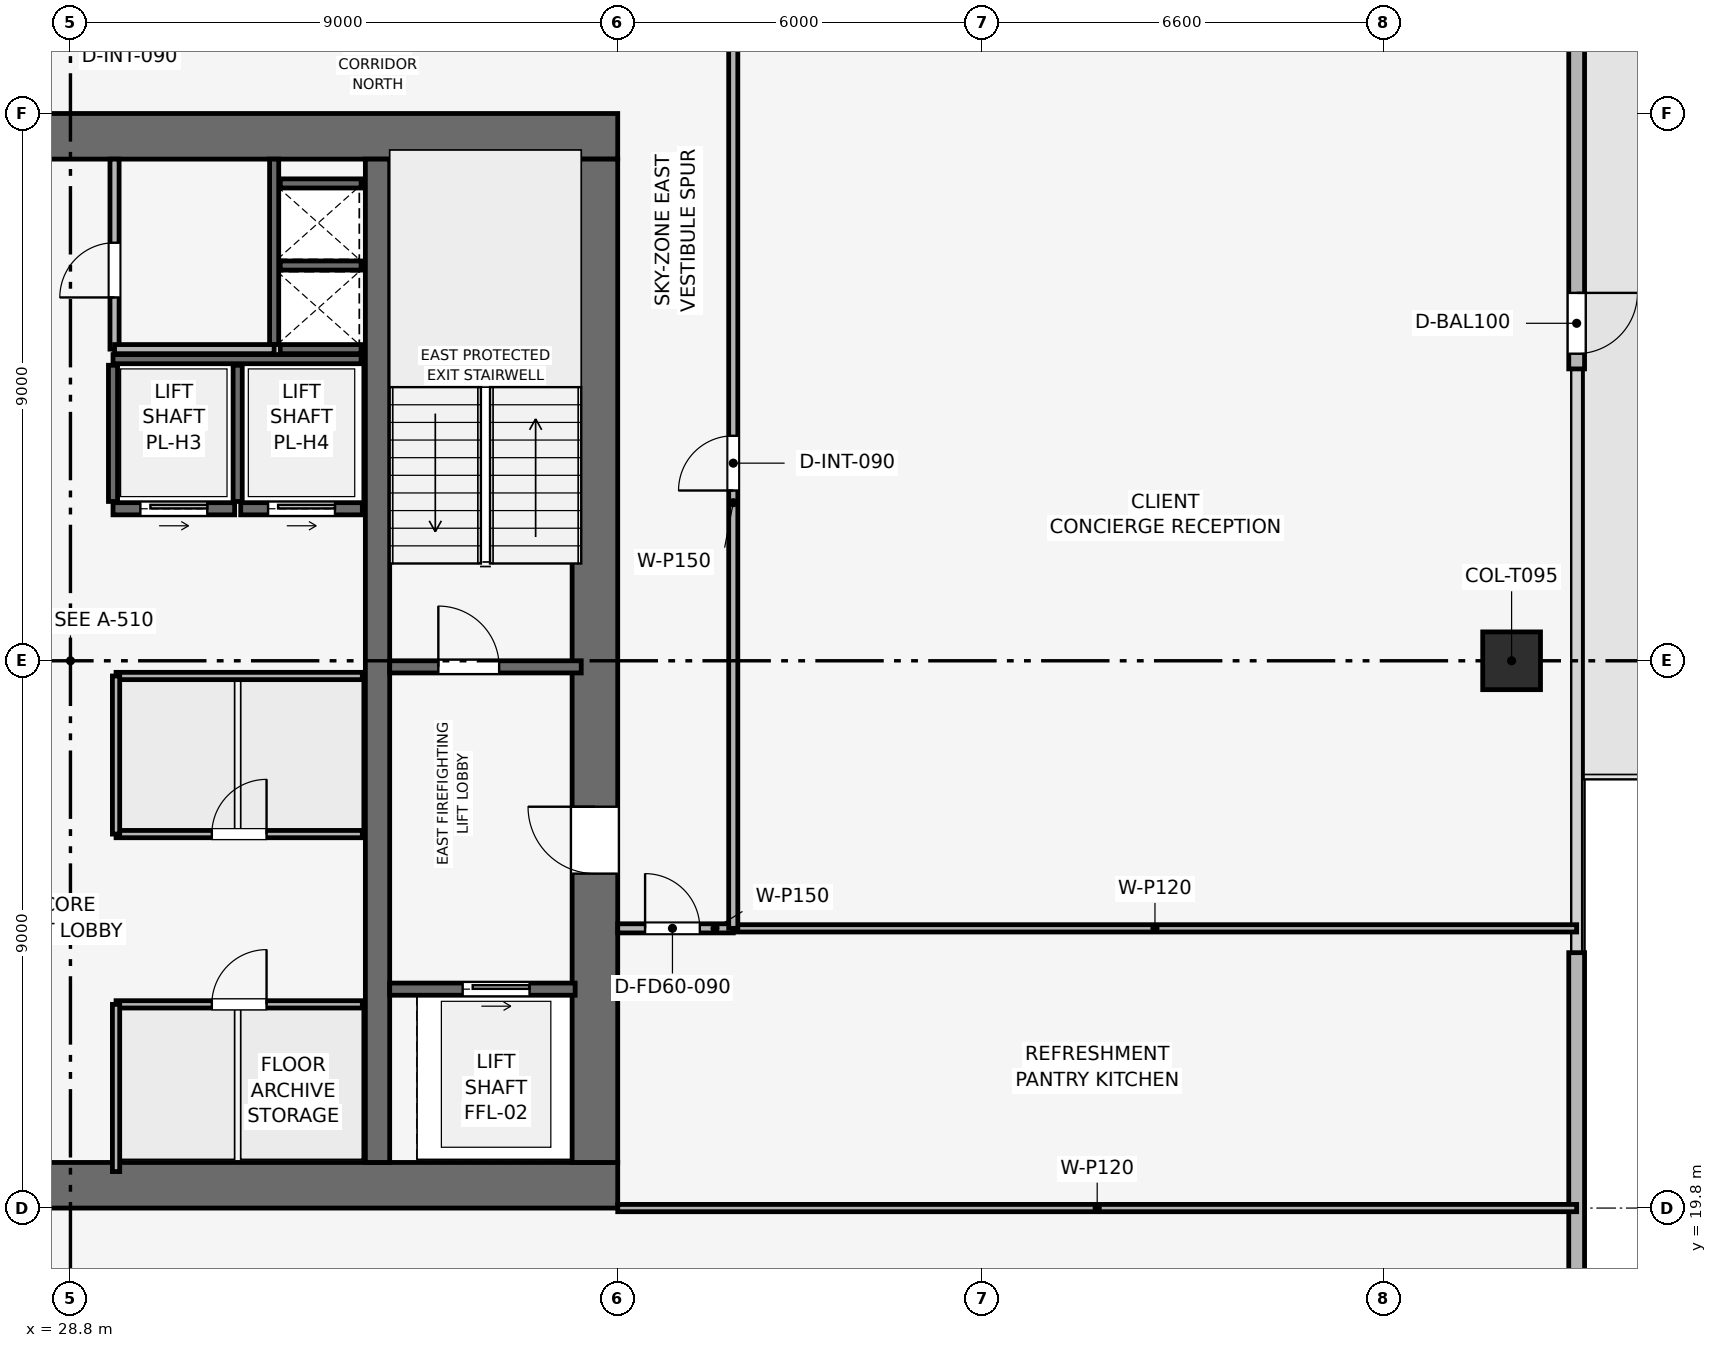
"""IFC4 building model, lengths in metres.
Left out: names, types, materials, properties, quantities, classifications, styles, units other than length and angle.
Written with IfcOpenShell. Run it as: python <this file> out.ifc"""

import sys

from ifc_helpers import new_model, si_unit, direction, frame, frame_2d, origin, origin_2d, place, context, subcontext, project, spatial, rectangle, extrude, element, fill, save


model = new_model("IFC4")
c1 = context("Model", 3, precision=1e-05, world=origin(), true_north=direction((0.0, 1.0)))
c2 = subcontext(c1, "Body", "Model", "MODEL_VIEW")
j1 = project(units=[si_unit("LENGTHUNIT", "METRE"), si_unit("PLANEANGLEUNIT", "RADIAN")], contexts=[c1])
p1 = place(None, origin())
s1 = spatial("IfcSite", under=j1, at=p1, CompositionType="ELEMENT")
p2 = place(p1, origin())
s2 = spatial("IfcBuilding", under=s1, at=p2, CompositionType="ELEMENT")
p3 = place(p2, frame((0.0, 0.0, 261.6)))
s3 = spatial("IfcBuildingStorey", under=s2, at=p3, CompositionType="ELEMENT", Elevation=261.6)
p4 = place(p3, frame((19.8, 20.175, 0.0), z_axis=(0.0, 0.0, 1.0), x_axis=(1.0, 0.0, 0.0)))
e1 = element("IfcWall", 1, at=p4, inside=s3, PredefinedType="SHEAR", context=c2, shape_type="SweptSolid", body=[
    extrude(rectangle(XDim=18.0, YDim=0.75, at=frame_2d((9.0, 0.0))), origin(), (0.0, 0.0, 1.0), 3.75),
])
p5 = place(p3, frame((19.8, 37.425, 0.0), z_axis=(0.0, 0.0, 1.0), x_axis=(1.0, 0.0, 0.0)))
e2 = element("IfcWall", 2, at=p5, inside=s3, PredefinedType="SHEAR", context=c2, shape_type="SweptSolid", body=[
    extrude(rectangle(XDim=18.0, YDim=0.75, at=frame_2d((9.0, 0.0))), origin(), (0.0, 0.0, 1.0), 3.75),
])
p6 = place(p5, frame((7.05, 0.0, 0.0)))
e3 = element("IfcOpeningElement", 3, at=p6, cuts=e2, PredefinedType="OPENING", context=c2, shape_type="SweptSolid", body=[
    extrude(rectangle(XDim=1.1, YDim=2.15, at=frame_2d((0.55, 1.075))), frame((0.0, 0.385, 0.0), z_axis=(0.0, -1.0, 0.0), x_axis=(1.0, 0.0, 0.0)), (0.0, 0.0, 1.0), 0.77),
])
p7 = place(p3, frame((37.425, 20.55, 0.0), z_axis=(0.0, 0.0, 1.0), x_axis=(0.0, 1.0, 0.0)))
e4 = element("IfcWall", 4, at=p7, inside=s3, PredefinedType="SHEAR", context=c2, shape_type="SweptSolid", body=[
    extrude(rectangle(XDim=16.5, YDim=0.75, at=frame_2d((8.25, 0.0))), origin(), (0.0, 0.0, 1.0), 3.75),
])
p8 = place(p7, frame((4.75, 0.0, 0.0)))
e5 = element("IfcOpeningElement", 5, at=p8, cuts=e4, PredefinedType="OPENING", context=c2, shape_type="SweptSolid", body=[
    extrude(rectangle(XDim=1.1, YDim=2.15, at=frame_2d((0.55, 1.075))), frame((0.0, 0.385, 0.0), z_axis=(0.0, -1.0, 0.0), x_axis=(1.0, 0.0, 0.0)), (0.0, 0.0, 1.0), 0.77),
])
p9 = place(p3, frame((33.85, 20.55, 0.0), z_axis=(0.0, 0.0, 1.0), x_axis=(0.0, 1.0, 0.0)))
e6 = element("IfcWall", 6, at=p9, inside=s3, PredefinedType="SHEAR", context=c2, shape_type="SweptSolid", body=[
    extrude(rectangle(XDim=16.5, YDim=0.4, at=frame_2d((8.25, 0.0))), origin(), (0.0, 0.0, 1.0), 3.75),
])
p10 = place(p3, frame((52.5, 28.8, 0.003), z_axis=(0.0, 0.0, 1.0), x_axis=(1.0, 0.0, 0.0)))
e7 = element("IfcColumn", 7, at=p10, inside=s3, PredefinedType="COLUMN", context=c2, shape_type="SweptSolid", body=[
    extrude(rectangle(XDim=0.95, YDim=0.95, at=origin_2d()), origin(), (0.0, 0.0, 1.0), 3.494),
])
p11 = place(p3, frame((53.57, 46.8, 0.0), z_axis=(0.0, 0.0, 1.0), x_axis=(0.0, -1.0, 0.0)))
e8 = element("IfcWall", 8, at=p11, inside=s3, PredefinedType="SOLIDWALL", context=c2, shape_type="SweptSolid", body=[
    extrude(rectangle(XDim=13.2, YDim=0.26, at=frame_2d((6.6, 0.0))), origin(), (0.0, 0.0, 1.0), 3.5),
])
p12 = place(p11, frame((11.95, 0.0, 0.0)))
e9 = element("IfcOpeningElement", 9, at=p12, cuts=e8, PredefinedType="OPENING", context=c2, shape_type="SweptSolid", body=[
    extrude(rectangle(XDim=1.0, YDim=2.2, at=frame_2d((0.5, 1.1))), frame((0.0, 0.14, 0.0), z_axis=(0.0, -1.0, 0.0), x_axis=(1.0, 0.0, 0.0)), (0.0, 0.0, 1.0), 0.28),
])
p13 = place(p3, frame((53.57, 24.0, 0.0), z_axis=(0.0, 0.0, 1.0), x_axis=(0.0, -1.0, 0.0)))
e10 = element("IfcWall", 10, at=p13, inside=s3, PredefinedType="SOLIDWALL", context=c2, shape_type="SweptSolid", body=[
    extrude(rectangle(XDim=13.2, YDim=0.26, at=frame_2d((6.6, 0.0))), origin(), (0.0, 0.0, 1.0), 3.5),
])
p14 = place(p13, frame((11.75, 0.0, 0.9)))
e11 = element("IfcOpeningElement", 11, at=p14, cuts=e10, PredefinedType="OPENING", context=c2, shape_type="SweptSolid", body=[
    extrude(rectangle(XDim=1.2, YDim=2.1, at=frame_2d((0.6, 1.05))), frame((0.0, 0.14, 0.0), z_axis=(0.0, -1.0, 0.0), x_axis=(1.0, 0.0, 0.0)), (0.0, 0.0, 1.0), 0.28),
])
p15 = place(p3, frame((34.05, 28.7, 0.0), z_axis=(0.0, 0.0, 1.0), x_axis=(1.0, 0.0, 0.0)))
e12 = element("IfcWall", 12, at=p15, inside=s3, PredefinedType="SHEAR", context=c2, shape_type="SweptSolid", body=[
    extrude(rectangle(XDim=3.15, YDim=0.2, at=frame_2d((1.575, 0.0))), origin(), (0.0, 0.0, 1.0), 3.5),
])
p16 = place(p15, frame((0.8, 0.0, 0.0)))
e13 = element("IfcOpeningElement", 13, at=p16, cuts=e12, PredefinedType="OPENING", context=c2, shape_type="SweptSolid", body=[
    extrude(rectangle(XDim=1.0, YDim=2.1, at=frame_2d((0.5, 1.05))), frame((0.0, 0.11, 0.0), z_axis=(0.0, -1.0, 0.0), x_axis=(1.0, 0.0, 0.0)), (0.0, 0.0, 1.0), 0.22),
])
p17 = place(p3, frame((32.15, 34.0, 0.0), z_axis=(0.0, 0.0, 1.0), x_axis=(0.0, 1.0, 0.0)))
e14 = element("IfcWall", 14, at=p17, inside=s3, PredefinedType="SHEAR", context=c2, shape_type="SweptSolid", body=[
    extrude(rectangle(XDim=3.05, YDim=0.15, at=frame_2d((1.525, 0.0))), origin(), (0.0, 0.0, 1.0), 3.5),
])
for number, where, z_axis, x_axis in (
    (15, (32.25, 33.925, 0.0), (0.0, 0.0, 1.0), (1.0, 0.0, 0.0)),
    (16, (32.25, 35.3, 0.0), (0.0, 0.0, 1.0), (1.0, 0.0, 0.0)),
):
    element("IfcWall", number, at=place(p3, frame(where, z_axis=z_axis, x_axis=x_axis)), inside=s3, PredefinedType="SHEAR", context=c2, shape_type="SweptSolid", body=[
        extrude(rectangle(XDim=1.33, YDim=0.15, at=frame_2d((0.665, 0.0))), origin(), (0.0, 0.0, 1.0), 3.5),
    ])
p18 = place(p3, frame((34.05, 23.4, 0.0), z_axis=(0.0, 0.0, 1.0), x_axis=(1.0, 0.0, 0.0)))
e17 = element("IfcWall", 17, at=p18, inside=s3, PredefinedType="SHEAR", context=c2, shape_type="SweptSolid", body=[
    extrude(rectangle(XDim=3.05, YDim=0.2, at=frame_2d((1.525, 0.0))), origin(), (0.0, 0.0, 1.0), 3.5),
])
p19 = place(p18, frame((1.2, 0.0, 0.0)))
e18 = element("IfcOpeningElement", 18, at=p19, cuts=e17, PredefinedType="OPENING", context=c2, shape_type="SweptSolid", body=[
    extrude(rectangle(XDim=1.1, YDim=2.15, at=frame_2d((0.55, 1.075))), frame((0.0, 0.11, 0.0), z_axis=(0.0, -1.0, 0.0), x_axis=(1.0, 0.0, 0.0)), (0.0, 0.0, 1.0), 0.22),
])
p20 = place(p3, frame((29.5, 31.3, 0.0), z_axis=(0.0, 0.0, 1.0), x_axis=(1.0, 0.0, 0.0)))
e19 = element("IfcWall", 19, at=p20, inside=s3, PredefinedType="SHEAR", context=c2, shape_type="SweptSolid", body=[
    extrude(rectangle(XDim=2.0, YDim=0.2, at=frame_2d((1.0, 0.0))), origin(), (0.0, 0.0, 1.0), 3.5),
])
p21 = place(p20, frame((0.45, 0.0, 0.0)))
e20 = element("IfcOpeningElement", 20, at=p21, cuts=e19, PredefinedType="OPENING", context=c2, shape_type="SweptSolid", body=[
    extrude(rectangle(XDim=1.1, YDim=2.15, at=frame_2d((0.55, 1.075))), frame((0.0, 0.11, 0.0), z_axis=(0.0, -1.0, 0.0), x_axis=(1.0, 0.0, 0.0)), (0.0, 0.0, 1.0), 0.22),
])
p22 = place(p3, frame((31.6, 31.3, 0.0), z_axis=(0.0, 0.0, 1.0), x_axis=(1.0, 0.0, 0.0)))
e21 = element("IfcWall", 21, at=p22, inside=s3, PredefinedType="SHEAR", context=c2, shape_type="SweptSolid", body=[
    extrude(rectangle(XDim=2.0, YDim=0.2, at=frame_2d((1.0, 0.0))), origin(), (0.0, 0.0, 1.0), 3.5),
])
p23 = place(p22, frame((0.45, 0.0, 0.0)))
e22 = element("IfcOpeningElement", 22, at=p23, cuts=e21, PredefinedType="OPENING", context=c2, shape_type="SweptSolid", body=[
    extrude(rectangle(XDim=1.1, YDim=2.15, at=frame_2d((0.55, 1.075))), frame((0.0, 0.11, 0.0), z_axis=(0.0, -1.0, 0.0), x_axis=(1.0, 0.0, 0.0)), (0.0, 0.0, 1.0), 0.22),
])
p24 = place(p3, frame((32.25, 36.65, 0.0), z_axis=(0.0, 0.0, 1.0), x_axis=(1.0, 0.0, 0.0)))
e23 = element("IfcWall", 23, at=p24, inside=s3, PredefinedType="SHEAR", context=c2, shape_type="SweptSolid", body=[
    extrude(rectangle(XDim=1.33, YDim=0.15, at=frame_2d((0.665, 0.0))), origin(), (0.0, 0.0, 1.0), 3.5),
])
p25 = place(p3, frame((29.5, 33.76, 0.0), z_axis=(0.0, 0.0, 1.0), x_axis=(1.0, 0.0, 0.0)))
e24 = element("IfcWall", 24, at=p25, inside=s3, PredefinedType="SHEAR", context=c2, shape_type="SweptSolid", body=[
    extrude(rectangle(XDim=4.08, YDim=0.15, at=frame_2d((2.04, 0.0))), origin(), (0.0, 0.0, 1.0), 3.5),
])
for number, where, z_axis, x_axis in (
    (25, (29.5, 31.42, 0.0), (0.0, 0.0, 1.0), (0.0, 1.0, 0.0)),
    (26, (31.55, 31.42, 0.0), (0.0, 0.0, 1.0), (0.0, 1.0, 0.0)),
):
    element("IfcWall", number, at=place(p3, frame(where, z_axis=z_axis, x_axis=x_axis)), inside=s3, PredefinedType="SHEAR", context=c2, shape_type="SweptSolid", body=[
        extrude(rectangle(XDim=2.24, YDim=0.15, at=frame_2d((1.12, 0.0))), origin(), (0.0, 0.0, 1.0), 3.5),
    ])
p26 = place(p3, frame((29.525, 33.925, 0.0), z_axis=(0.0, 0.0, 1.0), x_axis=(0.0, 1.0, 0.0)))
e27 = element("IfcWall", 27, at=p26, inside=s3, PredefinedType="PARTITIONING", context=c2, shape_type="SweptSolid", body=[
    extrude(rectangle(XDim=3.125, YDim=0.15, at=frame_2d((1.562, 0.0))), origin(), (0.0, 0.0, 1.0), 3.5),
])
p27 = place(p26, frame((0.85, 0.0, 0.0)))
e28 = element("IfcOpeningElement", 28, at=p27, cuts=e27, PredefinedType="OPENING", context=c2, shape_type="SweptSolid", body=[
    extrude(rectangle(XDim=0.9, YDim=2.1, at=frame_2d((0.45, 1.05))), frame((0.0, 0.085, 0.0), z_axis=(0.0, -1.0, 0.0), x_axis=(1.0, 0.0, 0.0)), (0.0, 0.0, 1.0), 0.17),
])
p28 = place(p3, frame((29.525, 33.925, 0.0), z_axis=(0.0, 0.0, 1.0), x_axis=(1.0, 0.0, 0.0)))
e29 = element("IfcWall", 29, at=p28, inside=s3, PredefinedType="PARTITIONING", context=c2, shape_type="SweptSolid", body=[
    extrude(rectangle(XDim=2.625, YDim=0.15, at=frame_2d((1.312, 0.0))), origin(), (0.0, 0.0, 1.0), 3.5),
])
p29 = place(p3, frame((29.55, 23.15, 0.0), z_axis=(0.0, 0.0, 1.0), x_axis=(1.0, 0.0, 0.0)))
e30 = element("IfcWall", 30, at=p29, inside=s3, PredefinedType="PARTITIONING", context=c2, shape_type="SweptSolid", body=[
    extrude(rectangle(XDim=4.05, YDim=0.12, at=frame_2d((2.025, 0.0))), origin(), (0.0, 0.0, 1.0), 3.5),
])
p30 = place(p29, frame((1.575, 0.0, 0.0)))
e31 = element("IfcOpeningElement", 31, at=p30, cuts=e30, PredefinedType="OPENING", context=c2, shape_type="SweptSolid", body=[
    extrude(rectangle(XDim=0.9, YDim=2.1, at=frame_2d((0.45, 1.05))), frame((0.0, 0.07, 0.0), z_axis=(0.0, -1.0, 0.0), x_axis=(1.0, 0.0, 0.0)), (0.0, 0.0, 1.0), 0.14),
])
p31 = place(p3, frame((29.55, 20.4, 0.0), z_axis=(0.0, 0.0, 1.0), x_axis=(0.0, 1.0, 0.0)))
e32 = element("IfcWall", 32, at=p31, inside=s3, PredefinedType="PARTITIONING", context=c2, shape_type="SweptSolid", body=[
    extrude(rectangle(XDim=2.75, YDim=0.12, at=frame_2d((1.375, 0.0))), origin(), (0.0, 0.0, 1.0), 3.5),
])
p32 = place(p3, frame((29.55, 25.95, 0.0), z_axis=(0.0, 0.0, 1.0), x_axis=(1.0, 0.0, 0.0)))
e33 = element("IfcWall", 33, at=p32, inside=s3, PredefinedType="PARTITIONING", context=c2, shape_type="SweptSolid", body=[
    extrude(rectangle(XDim=4.05, YDim=0.12, at=frame_2d((2.025, 0.0))), origin(), (0.0, 0.0, 1.0), 3.5),
])
p33 = place(p32, frame((1.575, 0.0, 0.0)))
e34 = element("IfcOpeningElement", 34, at=p33, cuts=e33, PredefinedType="OPENING", context=c2, shape_type="SweptSolid", body=[
    extrude(rectangle(XDim=0.9, YDim=2.1, at=frame_2d((0.45, 1.05))), frame((0.0, 0.07, 0.0), z_axis=(0.0, -1.0, 0.0), x_axis=(1.0, 0.0, 0.0)), (0.0, 0.0, 1.0), 0.14),
])
p34 = place(p3, frame((29.55, 28.55, 0.0), z_axis=(0.0, 0.0, 1.0), x_axis=(1.0, 0.0, 0.0)))
e35 = element("IfcWall", 35, at=p34, inside=s3, PredefinedType="PARTITIONING", context=c2, shape_type="SweptSolid", body=[
    extrude(rectangle(XDim=4.05, YDim=0.12, at=frame_2d((2.025, 0.0))), origin(), (0.0, 0.0, 1.0), 3.5),
])
p35 = place(p3, frame((29.55, 25.95, 0.0), z_axis=(0.0, 0.0, 1.0), x_axis=(0.0, 1.0, 0.0)))
e36 = element("IfcWall", 36, at=p35, inside=s3, PredefinedType="PARTITIONING", context=c2, shape_type="SweptSolid", body=[
    extrude(rectangle(XDim=2.6, YDim=0.12, at=frame_2d((1.3, 0.0))), origin(), (0.0, 0.0, 1.0), 3.5),
])
p36 = place(p3, frame((37.8, 19.8, 0.0), z_axis=(0.0, 0.0, 1.0), x_axis=(1.0, 0.0, 0.0)))
e37 = element("IfcWall", 37, at=p36, inside=s3, PredefinedType="PARTITIONING", context=c2, shape_type="SweptSolid", body=[
    extrude(rectangle(XDim=15.77, YDim=0.12, at=frame_2d((7.885, 0.0))), origin(), (0.0, 0.0, 1.0), 3.085),
])
p37 = place(p3, frame((37.8, 24.4, 0.0), z_axis=(0.0, 0.0, 1.0), x_axis=(1.0, 0.0, 0.0)))
e38 = element("IfcWall", 38, at=p37, inside=s3, PredefinedType="PARTITIONING", context=c2, shape_type="SweptSolid", body=[
    extrude(rectangle(XDim=1.9, YDim=0.15, at=frame_2d((0.95, 0.0))), origin(), (0.0, 0.0, 1.0), 3.5),
])
p38 = place(p37, frame((0.45, 0.0, 0.0)))
e39 = element("IfcOpeningElement", 39, at=p38, cuts=e38, PredefinedType="OPENING", context=c2, shape_type="SweptSolid", body=[
    extrude(rectangle(XDim=0.9, YDim=2.1, at=frame_2d((0.45, 1.05))), frame((0.0, 0.085, 0.0), z_axis=(0.0, -1.0, 0.0), x_axis=(1.0, 0.0, 0.0)), (0.0, 0.0, 1.0), 0.17),
])
p39 = place(p3, frame((39.7, 24.4, 0.0), z_axis=(0.0, 0.0, 1.0), x_axis=(1.0, 0.0, 0.0)))
e40 = element("IfcWall", 40, at=p39, inside=s3, PredefinedType="PARTITIONING", context=c2, shape_type="SweptSolid", body=[
    extrude(rectangle(XDim=13.87, YDim=0.12, at=frame_2d((6.935, 0.0))), origin(), (0.0, 0.0, 1.0), 3.085),
])
p40 = place(p3, frame((39.7, 24.4, 0.0), z_axis=(0.0, 0.0, 1.0), x_axis=(0.0, 1.0, 0.0)))
e41 = element("IfcWall", 41, at=p40, inside=s3, PredefinedType="PARTITIONING", context=c2, shape_type="SweptSolid", body=[
    extrude(rectangle(XDim=15.3, YDim=0.15, at=frame_2d((7.65, 0.0))), origin(), (0.0, 0.0, 1.0), 3.085),
])
p41 = place(p40, frame((7.2, 0.0, 0.0)))
e42 = element("IfcOpeningElement", 42, at=p41, cuts=e41, PredefinedType="OPENING", context=c2, shape_type="SweptSolid", body=[
    extrude(rectangle(XDim=0.9, YDim=2.1, at=frame_2d((0.45, 1.05))), frame((0.0, 0.085, 0.0), z_axis=(0.0, -1.0, 0.0), x_axis=(1.0, 0.0, 0.0)), (0.0, 0.0, 1.0), 0.17),
])
p42 = place(p12, origin())
e43 = element("IfcDoor", 43, at=p42, inside=s3, OperationType="SINGLE_SWING_LEFT", PredefinedType="DOOR", context=c2, shape_type="SweptSolid", body=[
    extrude(rectangle(XDim=1.0, YDim=2.2, at=frame_2d((0.5, 1.1))), frame((0.0, 0.025, 0.0), z_axis=(0.0, -1.0, 0.0), x_axis=(1.0, 0.0, 0.0)), (0.0, 0.0, 1.0), 0.05),
])
fill(e9, e43)
p43 = place(p16, origin())
e44 = element("IfcDoor", 44, at=p43, inside=s3, OperationType="SINGLE_SWING_LEFT", PredefinedType="DOOR", context=c2, shape_type="SweptSolid", body=[
    extrude(rectangle(XDim=1.0, YDim=2.1, at=frame_2d((0.5, 1.05))), frame((0.0, 0.025, 0.0), z_axis=(0.0, -1.0, 0.0), x_axis=(1.0, 0.0, 0.0)), (0.0, 0.0, 1.0), 0.05),
])
fill(e13, e44)
p44 = place(p19, origin())
e45 = element("IfcDoor", 45, at=p44, inside=s3, OperationType="SLIDING_TO_RIGHT", PredefinedType="DOOR", context=c2, shape_type="SweptSolid", body=[
    extrude(rectangle(XDim=1.1, YDim=2.15, at=frame_2d((0.55, 1.075))), frame((0.0, 0.025, 0.0), z_axis=(0.0, -1.0, 0.0), x_axis=(1.0, 0.0, 0.0)), (0.0, 0.0, 1.0), 0.05),
])
fill(e18, e45)
p45 = place(p21, origin())
e46 = element("IfcDoor", 46, at=p45, inside=s3, OperationType="SLIDING_TO_RIGHT", PredefinedType="DOOR", context=c2, shape_type="SweptSolid", body=[
    extrude(rectangle(XDim=1.1, YDim=2.15, at=frame_2d((0.55, 1.075))), frame((0.0, 0.025, 0.0), z_axis=(0.0, -1.0, 0.0), x_axis=(1.0, 0.0, 0.0)), (0.0, 0.0, 1.0), 0.05),
])
fill(e20, e46)
p46 = place(p23, origin())
e47 = element("IfcDoor", 47, at=p46, inside=s3, OperationType="SLIDING_TO_RIGHT", PredefinedType="DOOR", context=c2, shape_type="SweptSolid", body=[
    extrude(rectangle(XDim=1.1, YDim=2.15, at=frame_2d((0.55, 1.075))), frame((0.0, 0.025, 0.0), z_axis=(0.0, -1.0, 0.0), x_axis=(1.0, 0.0, 0.0)), (0.0, 0.0, 1.0), 0.05),
])
fill(e22, e47)
p47 = place(p27, origin())
e48 = element("IfcDoor", 48, at=p47, inside=s3, OperationType="SINGLE_SWING_LEFT", PredefinedType="DOOR", context=c2, shape_type="SweptSolid", body=[
    extrude(rectangle(XDim=0.9, YDim=2.1, at=frame_2d((0.45, 1.05))), frame((0.0, 0.025, 0.0), z_axis=(0.0, -1.0, 0.0), x_axis=(1.0, 0.0, 0.0)), (0.0, 0.0, 1.0), 0.05),
])
fill(e28, e48)
p48 = place(p30, origin())
e49 = element("IfcDoor", 49, at=p48, inside=s3, OperationType="SINGLE_SWING_RIGHT", PredefinedType="DOOR", context=c2, shape_type="SweptSolid", body=[
    extrude(rectangle(XDim=0.9, YDim=2.1, at=frame_2d((0.45, 1.05))), frame((0.0, 0.025, 0.0), z_axis=(0.0, -1.0, 0.0), x_axis=(1.0, 0.0, 0.0)), (0.0, 0.0, 1.0), 0.05),
])
fill(e31, e49)
p49 = place(p33, origin())
e50 = element("IfcDoor", 50, at=p49, inside=s3, OperationType="SINGLE_SWING_RIGHT", PredefinedType="DOOR", context=c2, shape_type="SweptSolid", body=[
    extrude(rectangle(XDim=0.9, YDim=2.1, at=frame_2d((0.45, 1.05))), frame((0.0, 0.025, 0.0), z_axis=(0.0, -1.0, 0.0), x_axis=(1.0, 0.0, 0.0)), (0.0, 0.0, 1.0), 0.05),
])
fill(e34, e50)
p50 = place(p38, origin())
e51 = element("IfcDoor", 51, at=p50, inside=s3, OperationType="SINGLE_SWING_LEFT", PredefinedType="DOOR", context=c2, shape_type="SweptSolid", body=[
    extrude(rectangle(XDim=0.9, YDim=2.1, at=frame_2d((0.45, 1.05))), frame((0.0, 0.025, 0.0), z_axis=(0.0, -1.0, 0.0), x_axis=(1.0, 0.0, 0.0)), (0.0, 0.0, 1.0), 0.05),
])
fill(e39, e51)
p51 = place(p41, origin())
e52 = element("IfcDoor", 52, at=p51, inside=s3, OperationType="SINGLE_SWING_LEFT", PredefinedType="DOOR", context=c2, shape_type="SweptSolid", body=[
    extrude(rectangle(XDim=0.9, YDim=2.1, at=frame_2d((0.45, 1.05))), frame((0.0, 0.025, 0.0), z_axis=(0.0, -1.0, 0.0), x_axis=(1.0, 0.0, 0.0)), (0.0, 0.0, 1.0), 0.05),
])
fill(e42, e52)
p52 = place(p8, origin())
e53 = element("IfcDoor", 53, at=p52, inside=s3, OperationType="SINGLE_SWING_RIGHT", PredefinedType="DOOR", context=c2, shape_type="SweptSolid", body=[
    extrude(rectangle(XDim=1.1, YDim=2.15, at=frame_2d((0.55, 1.075))), frame((0.0, 0.025, 0.0), z_axis=(0.0, -1.0, 0.0), x_axis=(1.0, 0.0, 0.0)), (0.0, 0.0, 1.0), 0.05),
])
fill(e5, e53)
save(model, sys.argv[1])
